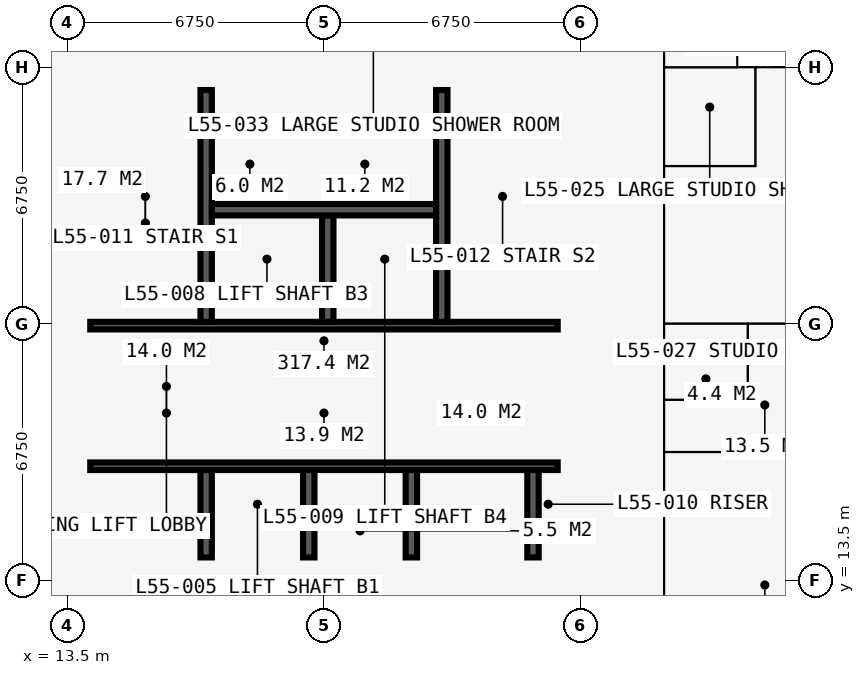
"""IFC4 building model, lengths in metres.
Left out: names, types, materials, properties, quantities, classifications, styles, units other than length and angle.
Written with IfcOpenShell. Run it as: python <this file> out.ifc"""

import sys

from ifc_helpers import new_model, si_unit, direction, frame, frame_2d, origin, place, context, subcontext, project, spatial, rectangle, extrude, element, fill, save


model = new_model("IFC4")
c1 = context("Model", 3, precision=1e-05, world=origin(), true_north=direction((0.0, 1.0)))
c2 = subcontext(c1, "Body", "Model", "MODEL_VIEW")
j1 = project(units=[si_unit("LENGTHUNIT", "METRE"), si_unit("PLANEANGLEUNIT", "RADIAN")], contexts=[c1])
p1 = place(None, origin())
s1 = spatial("IfcSite", under=j1, at=p1, CompositionType="ELEMENT")
p2 = place(p1, origin())
s2 = spatial("IfcBuilding", under=s1, at=p2, CompositionType="ELEMENT")
p3 = place(p2, frame((0.0, 0.0, 204.3)))
s3 = spatial("IfcBuildingStorey", under=s2, at=p3, CompositionType="ELEMENT", Elevation=204.3)
p4 = place(p3, frame((13.2, 13.5, 0.0), z_axis=(0.0, 0.0, 1.0), x_axis=(1.0, 0.0, 0.0)))
e1 = element("IfcWall", 1, at=p4, inside=s3, PredefinedType="SHEAR", context=c2, shape_type="SweptSolid", body=[
    extrude(rectangle(XDim=14.1, YDim=1.2, at=frame_2d((7.05, 0.0))), origin(), (0.0, 0.0, 1.0), 3.6),
])
p5 = place(p3, frame((26.85, 14.1, 0.0), z_axis=(0.0, 0.0, 1.0), x_axis=(0.0, 1.0, 0.0)))
e2 = element("IfcWall", 2, at=p5, inside=s3, PredefinedType="SHEAR", context=c2, shape_type="SweptSolid", body=[
    extrude(rectangle(XDim=12.3, YDim=0.9, at=frame_2d((6.15, 0.0))), origin(), (0.0, 0.0, 1.0), 3.6),
])
p6 = place(p5, frame((3.65, 0.0, 0.0)))
e3 = element("IfcOpeningElement", 3, at=p6, cuts=e2, PredefinedType="OPENING", context=c2, shape_type="SweptSolid", body=[
    extrude(rectangle(XDim=1.2, YDim=2.2, at=frame_2d((0.6, 1.1))), frame((0.0, 0.46, 0.0), z_axis=(0.0, -1.0, 0.0), x_axis=(1.0, 0.0, 0.0)), (0.0, 0.0, 1.0), 0.92),
])
p7 = place(p3, frame((27.3, 27.0, 0.0), z_axis=(0.0, 0.0, 1.0), x_axis=(-1.0, 0.0, 0.0)))
e4 = element("IfcWall", 4, at=p7, inside=s3, PredefinedType="SHEAR", context=c2, shape_type="SweptSolid", body=[
    extrude(rectangle(XDim=14.1, YDim=1.2, at=frame_2d((7.05, 0.0))), origin(), (0.0, 0.0, 1.0), 3.6),
])
p8 = place(p7, frame((5.225, 0.0, 0.0)))
e5 = element("IfcOpeningElement", 5, at=p8, cuts=e4, PredefinedType="OPENING", context=c2, shape_type="SweptSolid", body=[
    extrude(rectangle(XDim=0.9, YDim=2.2, at=frame_2d((0.45, 1.1))), frame((0.0, 0.61, 0.0), z_axis=(0.0, -1.0, 0.0), x_axis=(1.0, 0.0, 0.0)), (0.0, 0.0, 1.0), 1.22),
])
p9 = place(p7, frame((8.2, 0.0, 0.0)))
e6 = element("IfcOpeningElement", 6, at=p9, cuts=e4, PredefinedType="OPENING", context=c2, shape_type="SweptSolid", body=[
    extrude(rectangle(XDim=1.0, YDim=2.2, at=frame_2d((0.5, 1.1))), frame((0.0, 0.61, 0.0), z_axis=(0.0, -1.0, 0.0), x_axis=(1.0, 0.0, 0.0)), (0.0, 0.0, 1.0), 1.22),
])
p10 = place(p3, frame((13.65, 26.4, 0.0), z_axis=(0.0, 0.0, 1.0), x_axis=(0.0, -1.0, 0.0)))
e7 = element("IfcWall", 7, at=p10, inside=s3, PredefinedType="SHEAR", context=c2, shape_type="SweptSolid", body=[
    extrude(rectangle(XDim=12.3, YDim=0.9, at=frame_2d((6.15, 0.0))), origin(), (0.0, 0.0, 1.0), 3.6),
])
p11 = place(p10, frame((7.45, 0.0, 0.0)))
e8 = element("IfcOpeningElement", 8, at=p11, cuts=e7, PredefinedType="OPENING", context=c2, shape_type="SweptSolid", body=[
    extrude(rectangle(XDim=1.2, YDim=2.2, at=frame_2d((0.6, 1.1))), frame((0.0, 0.46, 0.0), z_axis=(0.0, -1.0, 0.0), x_axis=(1.0, 0.0, 0.0)), (0.0, 0.0, 1.0), 0.92),
])
p12 = place(p3, frame((14.1, 16.5, 0.0), z_axis=(0.0, 0.0, 1.0), x_axis=(1.0, 0.0, 0.0)))
e9 = element("IfcWall", 9, at=p12, inside=s3, PredefinedType="SHEAR", context=c2, shape_type="SweptSolid", body=[
    extrude(rectangle(XDim=12.3, YDim=0.2, at=frame_2d((6.15, 0.0))), origin(), (0.0, 0.0, 1.0), 3.6),
])
p13 = place(p12, frame((0.9, 0.0, 0.0)))
e10 = element("IfcOpeningElement", 10, at=p13, cuts=e9, PredefinedType="OPENING", context=c2, shape_type="SweptSolid", body=[
    extrude(rectangle(XDim=1.1, YDim=2.2, at=frame_2d((0.55, 1.1))), frame((0.0, 0.11, 0.0), z_axis=(0.0, -1.0, 0.0), x_axis=(1.0, 0.0, 0.0)), (0.0, 0.0, 1.0), 0.22),
])
p14 = place(p12, frame((4.31, 0.0, 0.0)))
e11 = element("IfcOpeningElement", 11, at=p14, cuts=e9, PredefinedType="OPENING", context=c2, shape_type="SweptSolid", body=[
    extrude(rectangle(XDim=1.1, YDim=2.2, at=frame_2d((0.55, 1.1))), frame((0.0, 0.11, 0.0), z_axis=(0.0, -1.0, 0.0), x_axis=(1.0, 0.0, 0.0)), (0.0, 0.0, 1.0), 0.22),
])
p15 = place(p12, frame((6.45, 0.0, 0.0)))
e12 = element("IfcOpeningElement", 12, at=p15, cuts=e9, PredefinedType="OPENING", context=c2, shape_type="SweptSolid", body=[
    extrude(rectangle(XDim=1.1, YDim=2.2, at=frame_2d((0.55, 1.1))), frame((0.0, 0.11, 0.0), z_axis=(0.0, -1.0, 0.0), x_axis=(1.0, 0.0, 0.0)), (0.0, 0.0, 1.0), 0.22),
])
p16 = place(p12, frame((9.5, 0.0, 0.0)))
e13 = element("IfcOpeningElement", 13, at=p16, cuts=e9, PredefinedType="OPENING", context=c2, shape_type="SweptSolid", body=[
    extrude(rectangle(XDim=1.1, YDim=2.2, at=frame_2d((0.55, 1.1))), frame((0.0, 0.11, 0.0), z_axis=(0.0, -1.0, 0.0), x_axis=(1.0, 0.0, 0.0)), (0.0, 0.0, 1.0), 0.22),
])
p17 = place(p3, frame((14.1, 20.2, 0.0), z_axis=(0.0, 0.0, 1.0), x_axis=(1.0, 0.0, 0.0)))
e14 = element("IfcWall", 14, at=p17, inside=s3, PredefinedType="SHEAR", context=c2, shape_type="SweptSolid", body=[
    extrude(rectangle(XDim=12.3, YDim=0.2, at=frame_2d((6.15, 0.0))), origin(), (0.0, 0.0, 1.0), 3.6),
])
p18 = place(p17, frame((4.56, 0.0, 0.0)))
e15 = element("IfcOpeningElement", 15, at=p18, cuts=e14, PredefinedType="OPENING", context=c2, shape_type="SweptSolid", body=[
    extrude(rectangle(XDim=1.1, YDim=2.2, at=frame_2d((0.55, 1.1))), frame((0.0, 0.11, 0.0), z_axis=(0.0, -1.0, 0.0), x_axis=(1.0, 0.0, 0.0)), (0.0, 0.0, 1.0), 0.22),
])
p19 = place(p17, frame((6.7, 0.0, 0.0)))
e16 = element("IfcOpeningElement", 16, at=p19, cuts=e14, PredefinedType="OPENING", context=c2, shape_type="SweptSolid", body=[
    extrude(rectangle(XDim=1.1, YDim=2.2, at=frame_2d((0.55, 1.1))), frame((0.0, 0.11, 0.0), z_axis=(0.0, -1.0, 0.0), x_axis=(1.0, 0.0, 0.0)), (0.0, 0.0, 1.0), 0.22),
])
p20 = place(p17, frame((0.35, 0.0, 0.0)))
e17 = element("IfcOpeningElement", 17, at=p20, cuts=e14, PredefinedType="OPENING", context=c2, shape_type="SweptSolid", body=[
    extrude(rectangle(XDim=1.1, YDim=2.2, at=frame_2d((0.55, 1.1))), frame((0.0, 0.11, 0.0), z_axis=(0.0, -1.0, 0.0), x_axis=(1.0, 0.0, 0.0)), (0.0, 0.0, 1.0), 0.22),
])
p21 = place(p17, frame((9.75, 0.0, 0.0)))
e18 = element("IfcOpeningElement", 18, at=p21, cuts=e14, PredefinedType="OPENING", context=c2, shape_type="SweptSolid", body=[
    extrude(rectangle(XDim=1.1, YDim=2.2, at=frame_2d((0.55, 1.1))), frame((0.0, 0.11, 0.0), z_axis=(0.0, -1.0, 0.0), x_axis=(1.0, 0.0, 0.0)), (0.0, 0.0, 1.0), 0.22),
])
for number, where, z_axis, x_axis in (
    (19, (17.15, 20.3, 0.0), (0.0, 0.0, 1.0), (0.0, 1.0, 0.0)),
    (20, (23.35, 20.3, 0.0), (0.0, 0.0, 1.0), (0.0, 1.0, 0.0)),
):
    element("IfcWall", number, at=place(p3, frame(where, z_axis=z_axis, x_axis=x_axis)), inside=s3, PredefinedType="SHEAR", context=c2, shape_type="SweptSolid", body=[
        extrude(rectangle(XDim=6.1, YDim=0.3, at=frame_2d((3.05, 0.0))), origin(), (0.0, 0.0, 1.0), 3.6),
    ])
p22 = place(p3, frame((20.35, 20.3, 0.0), z_axis=(0.0, 0.0, 1.0), x_axis=(0.0, 1.0, 0.0)))
e21 = element("IfcWall", 21, at=p22, inside=s3, PredefinedType="SHEAR", context=c2, shape_type="SweptSolid", body=[
    extrude(rectangle(XDim=2.8, YDim=0.3, at=frame_2d((1.4, 0.0))), origin(), (0.0, 0.0, 1.0), 3.6),
])
p23 = place(p3, frame((17.3, 23.25, 0.0), z_axis=(0.0, 0.0, 1.0), x_axis=(1.0, 0.0, 0.0)))
e22 = element("IfcWall", 22, at=p23, inside=s3, PredefinedType="SHEAR", context=c2, shape_type="SweptSolid", body=[
    extrude(rectangle(XDim=5.9, YDim=0.3, at=frame_2d((2.95, 0.0))), origin(), (0.0, 0.0, 1.0), 3.6),
])
for number, where, z_axis, x_axis in (
    (23, (17.15, 14.1, 0.0), (0.0, 0.0, 1.0), (0.0, 1.0, 0.0)),
    (24, (19.85, 14.1, 0.0), (0.0, 0.0, 1.0), (0.0, 1.0, 0.0)),
    (25, (22.55, 14.1, 0.0), (0.0, 0.0, 1.0), (0.0, 1.0, 0.0)),
    (26, (25.75, 14.1, 0.0), (0.0, 0.0, 1.0), (0.0, 1.0, 0.0)),
):
    element("IfcWall", number, at=place(p3, frame(where, z_axis=z_axis, x_axis=x_axis)), inside=s3, PredefinedType="SHEAR", context=c2, shape_type="SweptSolid", body=[
        extrude(rectangle(XDim=2.3, YDim=0.3, at=frame_2d((1.15, 0.0))), origin(), (0.0, 0.0, 1.0), 3.6),
    ])
p24 = place(p3, frame((18.185, 16.6, 0.0), z_axis=(0.0, 0.0, 1.0), x_axis=(0.0, 1.0, 0.0)))
e27 = element("IfcWall", 27, at=p24, inside=s3, PredefinedType="PARTITIONING", context=c2, shape_type="SweptSolid", body=[
    extrude(rectangle(XDim=3.5, YDim=0.15, at=frame_2d((1.75, 0.0))), origin(), (0.0, 0.0, 1.0), 3.375),
])
p25 = place(p24, frame((1.15, 0.0, 0.0)))
e28 = element("IfcOpeningElement", 28, at=p25, cuts=e27, PredefinedType="OPENING", context=c2, shape_type="SweptSolid", body=[
    extrude(rectangle(XDim=1.2, YDim=2.2, at=frame_2d((0.6, 1.1))), frame((0.0, 0.085, 0.0), z_axis=(0.0, -1.0, 0.0), x_axis=(1.0, 0.0, 0.0)), (0.0, 0.0, 1.0), 0.17),
])
p26 = place(p3, frame((22.315, 16.6, 0.0), z_axis=(0.0, 0.0, 1.0), x_axis=(0.0, 1.0, 0.0)))
e29 = element("IfcWall", 29, at=p26, inside=s3, PredefinedType="PARTITIONING", context=c2, shape_type="SweptSolid", body=[
    extrude(rectangle(XDim=3.5, YDim=0.15, at=frame_2d((1.75, 0.0))), origin(), (0.0, 0.0, 1.0), 3.375),
])
p27 = place(p26, frame((1.15, 0.0, 0.0)))
e30 = element("IfcOpeningElement", 30, at=p27, cuts=e29, PredefinedType="OPENING", context=c2, shape_type="SweptSolid", body=[
    extrude(rectangle(XDim=1.2, YDim=2.2, at=frame_2d((0.6, 1.1))), frame((0.0, 0.085, 0.0), z_axis=(0.0, -1.0, 0.0), x_axis=(1.0, 0.0, 0.0)), (0.0, 0.0, 1.0), 0.17),
])
p28 = place(p3, frame((19.375, 23.4, 0.0), z_axis=(0.0, 0.0, 1.0), x_axis=(0.0, 1.0, 0.0)))
e31 = element("IfcWall", 31, at=p28, inside=s3, PredefinedType="PARTITIONING", context=c2, shape_type="SweptSolid", body=[
    extrude(rectangle(XDim=3.0, YDim=0.15, at=frame_2d((1.5, 0.0))), origin(), (0.0, 0.0, 1.0), 3.375),
])
p29 = place(p3, frame((29.2, 11.3, 0.0), z_axis=(0.0, 0.0, 1.0), x_axis=(0.0, 1.0, 0.0)))
e32 = element("IfcWall", 32, at=p29, inside=s3, PredefinedType="PARTITIONING", context=c2, shape_type="SweptSolid", body=[
    extrude(rectangle(XDim=17.9, YDim=0.2, at=frame_2d((8.95, 0.0))), origin(), (0.0, 0.0, 1.0), 3.375),
])
p30 = place(p29, frame((2.3, 0.0, 0.0)))
e33 = element("IfcOpeningElement", 33, at=p30, cuts=e32, PredefinedType="OPENING", context=c2, shape_type="SweptSolid", body=[
    extrude(rectangle(XDim=1.0, YDim=2.2, at=frame_2d((0.5, 1.1))), frame((0.0, 0.11, 0.0), z_axis=(0.0, -1.0, 0.0), x_axis=(1.0, 0.0, 0.0)), (0.0, 0.0, 1.0), 0.22),
])
p31 = place(p29, frame((10.55, 0.0, 0.0)))
e34 = element("IfcOpeningElement", 34, at=p31, cuts=e32, PredefinedType="OPENING", context=c2, shape_type="SweptSolid", body=[
    extrude(rectangle(XDim=0.95, YDim=2.2, at=frame_2d((0.475, 1.1))), frame((0.0, 0.11, 0.0), z_axis=(0.0, -1.0, 0.0), x_axis=(1.0, 0.0, 0.0)), (0.0, 0.0, 1.0), 0.22),
])
p32 = place(p29, frame((5.775, 0.0, 0.0)))
e35 = element("IfcOpeningElement", 35, at=p32, cuts=e32, PredefinedType="OPENING", context=c2, shape_type="SweptSolid", body=[
    extrude(rectangle(XDim=0.95, YDim=2.2, at=frame_2d((0.475, 1.1))), frame((0.0, 0.11, 0.0), z_axis=(0.0, -1.0, 0.0), x_axis=(1.0, 0.0, 0.0)), (0.0, 0.0, 1.0), 0.22),
])
p33 = place(p29, frame((16.3, 0.0, 0.0)))
e36 = element("IfcOpeningElement", 36, at=p33, cuts=e32, PredefinedType="OPENING", context=c2, shape_type="SweptSolid", body=[
    extrude(rectangle(XDim=1.0, YDim=2.2, at=frame_2d((0.5, 1.1))), frame((0.0, 0.11, 0.0), z_axis=(0.0, -1.0, 0.0), x_axis=(1.0, 0.0, 0.0)), (0.0, 0.0, 1.0), 0.22),
])
p34 = place(p3, frame((29.2, 16.875, 0.0), z_axis=(0.0, 0.0, 1.0), x_axis=(1.0, 0.0, 0.0)))
e37 = element("IfcWall", 37, at=p34, inside=s3, PredefinedType="PARTITIONING", context=c2, shape_type="SweptSolid", body=[
    extrude(rectangle(XDim=5.284, YDim=0.15, at=frame_2d((2.642, 0.0))), origin(), (0.0, 0.0, 1.0), 3.375),
])
p35 = place(p3, frame((29.2, 18.25, 0.0), z_axis=(0.0, 0.0, 1.0), x_axis=(1.0, 0.0, 0.0)))
e38 = element("IfcWall", 38, at=p35, inside=s3, PredefinedType="PARTITIONING", context=c2, shape_type="SweptSolid", body=[
    extrude(rectangle(XDim=2.2, YDim=0.1, at=frame_2d((1.1, 0.0))), origin(), (0.0, 0.0, 1.0), 3.375),
])
p36 = place(p3, frame((29.2, 20.25, 0.0), z_axis=(0.0, 0.0, 1.0), x_axis=(1.0, 0.0, 0.0)))
e39 = element("IfcWall", 39, at=p36, inside=s3, PredefinedType="PARTITIONING", context=c2, shape_type="SweptSolid", body=[
    extrude(rectangle(XDim=5.284, YDim=0.175, at=frame_2d((2.642, 0.0))), origin(), (0.0, 0.0, 1.0), 2.806),
])
p37 = place(p36, frame((0.65, 0.0, 0.0)))
e40 = element("IfcOpeningElement", 40, at=p37, cuts=e39, PredefinedType="OPENING", context=c2, shape_type="SweptSolid", body=[
    extrude(rectangle(XDim=0.9, YDim=2.2, at=frame_2d((0.45, 1.1))), frame((0.0, 0.097, 0.0), z_axis=(0.0, -1.0, 0.0), x_axis=(1.0, 0.0, 0.0)), (0.0, 0.0, 1.0), 0.195),
])
p38 = place(p3, frame((29.2, 24.4, 0.0), z_axis=(0.0, 0.0, 1.0), x_axis=(1.0, 0.0, 0.0)))
e41 = element("IfcWall", 41, at=p38, inside=s3, PredefinedType="PARTITIONING", context=c2, shape_type="SweptSolid", body=[
    extrude(rectangle(XDim=2.4, YDim=0.1, at=frame_2d((1.2, 0.0))), origin(), (0.0, 0.0, 1.0), 3.375),
])
p39 = place(p3, frame((29.2, 27.0, 0.0), z_axis=(0.0, 0.0, 1.0), x_axis=(1.0, 0.0, 0.0)))
e42 = element("IfcWall", 42, at=p39, inside=s3, PredefinedType="PARTITIONING", context=c2, shape_type="SweptSolid", body=[
    extrude(rectangle(XDim=5.284, YDim=0.175, at=frame_2d((2.642, 0.0))), origin(), (0.0, 0.0, 1.0), 2.806),
])
p40 = place(p3, frame((31.125, 27.0, 0.0), z_axis=(0.0, 0.0, 1.0), x_axis=(0.0, 1.0, 0.0)))
e43 = element("IfcWall", 43, at=p40, inside=s3, PredefinedType="PARTITIONING", context=c2, shape_type="SweptSolid", body=[
    extrude(rectangle(XDim=0.734, YDim=0.15, at=frame_2d((0.367, 0.0))), origin(), (0.0, 0.0, 1.0), 3.375),
])
p41 = place(p3, frame((31.4, 18.25, 0.0), z_axis=(0.0, 0.0, 1.0), x_axis=(0.0, 1.0, 0.0)))
e44 = element("IfcWall", 44, at=p41, inside=s3, PredefinedType="PARTITIONING", context=c2, shape_type="SweptSolid", body=[
    extrude(rectangle(XDim=2.0, YDim=0.1, at=frame_2d((1.0, 0.0))), origin(), (0.0, 0.0, 1.0), 3.375),
])
p42 = place(p3, frame((31.6, 24.4, 0.0), z_axis=(0.0, 0.0, 1.0), x_axis=(0.0, 1.0, 0.0)))
e45 = element("IfcWall", 45, at=p42, inside=s3, PredefinedType="PARTITIONING", context=c2, shape_type="SweptSolid", body=[
    extrude(rectangle(XDim=2.6, YDim=0.1, at=frame_2d((1.3, 0.0))), origin(), (0.0, 0.0, 1.0), 3.375),
])
p43 = place(p42, frame((0.85, 0.0, 0.0)))
e46 = element("IfcOpeningElement", 46, at=p43, cuts=e45, PredefinedType="OPENING", context=c2, shape_type="SweptSolid", body=[
    extrude(rectangle(XDim=0.9, YDim=2.2, at=frame_2d((0.45, 1.1))), frame((0.0, 0.06, 0.0), z_axis=(0.0, -1.0, 0.0), x_axis=(1.0, 0.0, 0.0)), (0.0, 0.0, 1.0), 0.12),
])
p44 = place(p13, origin())
e47 = element("IfcDoor", 47, at=p44, inside=s3, OperationType="DOUBLE_DOOR_SLIDING", PredefinedType="DOOR", context=c2, shape_type="SweptSolid", body=[
    extrude(rectangle(XDim=1.1, YDim=2.2, at=frame_2d((0.55, 1.1))), frame((0.0, 0.025, 0.0), z_axis=(0.0, -1.0, 0.0), x_axis=(1.0, 0.0, 0.0)), (0.0, 0.0, 1.0), 0.05),
])
fill(e10, e47)
p45 = place(p14, origin())
e48 = element("IfcDoor", 48, at=p45, inside=s3, OperationType="DOUBLE_DOOR_SLIDING", PredefinedType="DOOR", context=c2, shape_type="SweptSolid", body=[
    extrude(rectangle(XDim=1.1, YDim=2.2, at=frame_2d((0.55, 1.1))), frame((0.0, 0.025, 0.0), z_axis=(0.0, -1.0, 0.0), x_axis=(1.0, 0.0, 0.0)), (0.0, 0.0, 1.0), 0.05),
])
fill(e11, e48)
p46 = place(p15, origin())
e49 = element("IfcDoor", 49, at=p46, inside=s3, OperationType="DOUBLE_DOOR_SLIDING", PredefinedType="DOOR", context=c2, shape_type="SweptSolid", body=[
    extrude(rectangle(XDim=1.1, YDim=2.2, at=frame_2d((0.55, 1.1))), frame((0.0, 0.025, 0.0), z_axis=(0.0, -1.0, 0.0), x_axis=(1.0, 0.0, 0.0)), (0.0, 0.0, 1.0), 0.05),
])
fill(e12, e49)
p47 = place(p16, origin())
e50 = element("IfcDoor", 50, at=p47, inside=s3, OperationType="DOUBLE_DOOR_SLIDING", PredefinedType="DOOR", context=c2, shape_type="SweptSolid", body=[
    extrude(rectangle(XDim=1.1, YDim=2.2, at=frame_2d((0.55, 1.1))), frame((0.0, 0.025, 0.0), z_axis=(0.0, -1.0, 0.0), x_axis=(1.0, 0.0, 0.0)), (0.0, 0.0, 1.0), 0.05),
])
fill(e13, e50)
p48 = place(p18, origin())
e51 = element("IfcDoor", 51, at=p48, inside=s3, OperationType="DOUBLE_DOOR_SLIDING", PredefinedType="DOOR", context=c2, shape_type="SweptSolid", body=[
    extrude(rectangle(XDim=1.1, YDim=2.2, at=frame_2d((0.55, 1.1))), frame((0.0, 0.025, 0.0), z_axis=(0.0, -1.0, 0.0), x_axis=(1.0, 0.0, 0.0)), (0.0, 0.0, 1.0), 0.05),
])
fill(e15, e51)
p49 = place(p19, origin())
e52 = element("IfcDoor", 52, at=p49, inside=s3, OperationType="DOUBLE_DOOR_SLIDING", PredefinedType="DOOR", context=c2, shape_type="SweptSolid", body=[
    extrude(rectangle(XDim=1.1, YDim=2.2, at=frame_2d((0.55, 1.1))), frame((0.0, 0.025, 0.0), z_axis=(0.0, -1.0, 0.0), x_axis=(1.0, 0.0, 0.0)), (0.0, 0.0, 1.0), 0.05),
])
fill(e16, e52)
p50 = place(p11, origin())
e53 = element("IfcDoor", 53, at=p50, inside=s3, OperationType="DOUBLE_DOOR_SINGLE_SWING", PredefinedType="DOOR", context=c2, shape_type="SweptSolid", body=[
    extrude(rectangle(XDim=1.2, YDim=2.2, at=frame_2d((0.6, 1.1))), frame((0.0, 0.025, 0.0), z_axis=(0.0, -1.0, 0.0), x_axis=(1.0, 0.0, 0.0)), (0.0, 0.0, 1.0), 0.05),
])
fill(e8, e53)
p51 = place(p6, origin())
e54 = element("IfcDoor", 54, at=p51, inside=s3, OperationType="DOUBLE_DOOR_SINGLE_SWING", PredefinedType="DOOR", context=c2, shape_type="SweptSolid", body=[
    extrude(rectangle(XDim=1.2, YDim=2.2, at=frame_2d((0.6, 1.1))), frame((0.0, 0.025, 0.0), z_axis=(0.0, -1.0, 0.0), x_axis=(1.0, 0.0, 0.0)), (0.0, 0.0, 1.0), 0.05),
])
fill(e3, e54)
p52 = place(p25, origin())
e55 = element("IfcDoor", 55, at=p52, inside=s3, OperationType="DOUBLE_DOOR_SINGLE_SWING", PredefinedType="DOOR", context=c2, shape_type="SweptSolid", body=[
    extrude(rectangle(XDim=1.2, YDim=2.2, at=frame_2d((0.6, 1.1))), frame((0.0, 0.025, 0.0), z_axis=(0.0, -1.0, 0.0), x_axis=(1.0, 0.0, 0.0)), (0.0, 0.0, 1.0), 0.05),
])
fill(e28, e55)
p53 = place(p27, origin())
e56 = element("IfcDoor", 56, at=p53, inside=s3, OperationType="DOUBLE_DOOR_SINGLE_SWING", PredefinedType="DOOR", context=c2, shape_type="SweptSolid", body=[
    extrude(rectangle(XDim=1.2, YDim=2.2, at=frame_2d((0.6, 1.1))), frame((0.0, 0.025, 0.0), z_axis=(0.0, -1.0, 0.0), x_axis=(1.0, 0.0, 0.0)), (0.0, 0.0, 1.0), 0.05),
])
fill(e30, e56)
p54 = place(p8, origin())
e57 = element("IfcDoor", 57, at=p54, inside=s3, OperationType="SINGLE_SWING_LEFT", PredefinedType="DOOR", context=c2, shape_type="SweptSolid", body=[
    extrude(rectangle(XDim=0.9, YDim=2.2, at=frame_2d((0.45, 1.1))), frame((0.0, 0.4, 0.0), z_axis=(0.0, -1.0, 0.0), x_axis=(1.0, 0.0, 0.0)), (0.0, 0.0, 1.0), 0.8),
])
fill(e5, e57)
p55 = place(p9, origin())
e58 = element("IfcDoor", 58, at=p55, inside=s3, OperationType="SINGLE_SWING_LEFT", PredefinedType="DOOR", context=c2, shape_type="SweptSolid", body=[
    extrude(rectangle(XDim=1.0, YDim=2.2, at=frame_2d((0.5, 1.1))), frame((0.0, 0.025, 0.0), z_axis=(0.0, -1.0, 0.0), x_axis=(1.0, 0.0, 0.0)), (0.0, 0.0, 1.0), 0.05),
])
fill(e6, e58)
p56 = place(p20, origin())
e59 = element("IfcDoor", 59, at=p56, inside=s3, OperationType="SINGLE_SWING_LEFT", PredefinedType="DOOR", context=c2, shape_type="SweptSolid", body=[
    extrude(rectangle(XDim=1.1, YDim=2.2, at=frame_2d((0.55, 1.1))), frame((0.0, 0.025, 0.0), z_axis=(0.0, -1.0, 0.0), x_axis=(1.0, 0.0, 0.0)), (0.0, 0.0, 1.0), 0.05),
])
fill(e17, e59)
p57 = place(p21, origin())
e60 = element("IfcDoor", 60, at=p57, inside=s3, OperationType="SINGLE_SWING_LEFT", PredefinedType="DOOR", context=c2, shape_type="SweptSolid", body=[
    extrude(rectangle(XDim=1.1, YDim=2.2, at=frame_2d((0.55, 1.1))), frame((0.0, 0.025, 0.0), z_axis=(0.0, -1.0, 0.0), x_axis=(1.0, 0.0, 0.0)), (0.0, 0.0, 1.0), 0.05),
])
fill(e18, e60)
p58 = place(p30, origin())
e61 = element("IfcDoor", 61, at=p58, inside=s3, OperationType="SINGLE_SWING_LEFT", PredefinedType="DOOR", context=c2, shape_type="SweptSolid", body=[
    extrude(rectangle(XDim=1.0, YDim=2.2, at=frame_2d((0.5, 1.1))), frame((0.0, 0.025, 0.0), z_axis=(0.0, -1.0, 0.0), x_axis=(1.0, 0.0, 0.0)), (0.0, 0.0, 1.0), 0.05),
])
fill(e33, e61)
p59 = place(p31, origin())
e62 = element("IfcDoor", 62, at=p59, inside=s3, OperationType="SINGLE_SWING_LEFT", PredefinedType="DOOR", context=c2, shape_type="SweptSolid", body=[
    extrude(rectangle(XDim=0.95, YDim=2.2, at=frame_2d((0.475, 1.1))), frame((0.0, 0.025, 0.0), z_axis=(0.0, -1.0, 0.0), x_axis=(1.0, 0.0, 0.0)), (0.0, 0.0, 1.0), 0.05),
])
fill(e34, e62)
p60 = place(p43, origin())
e63 = element("IfcDoor", 63, at=p60, inside=s3, OperationType="SINGLE_SWING_RIGHT", PredefinedType="DOOR", context=c2, shape_type="SweptSolid", body=[
    extrude(rectangle(XDim=0.9, YDim=2.2, at=frame_2d((0.45, 1.1))), frame((0.0, 0.025, 0.0), z_axis=(0.0, -1.0, 0.0), x_axis=(1.0, 0.0, 0.0)), (0.0, 0.0, 1.0), 0.05),
])
fill(e46, e63)
p61 = place(p32, origin())
e64 = element("IfcDoor", 64, at=p61, inside=s3, OperationType="SINGLE_SWING_LEFT", PredefinedType="DOOR", context=c2, shape_type="SweptSolid", body=[
    extrude(rectangle(XDim=0.95, YDim=2.2, at=frame_2d((0.475, 1.1))), frame((0.0, 0.025, 0.0), z_axis=(0.0, -1.0, 0.0), x_axis=(1.0, 0.0, 0.0)), (0.0, 0.0, 1.0), 0.05),
])
fill(e35, e64)
p62 = place(p37, origin())
e65 = element("IfcDoor", 65, at=p62, inside=s3, OperationType="SINGLE_SWING_RIGHT", PredefinedType="DOOR", context=c2, shape_type="SweptSolid", body=[
    extrude(rectangle(XDim=0.9, YDim=2.2, at=frame_2d((0.45, 1.1))), frame((0.0, 0.025, 0.0), z_axis=(0.0, -1.0, 0.0), x_axis=(1.0, 0.0, 0.0)), (0.0, 0.0, 1.0), 0.05),
])
fill(e40, e65)
save(model, sys.argv[1])
